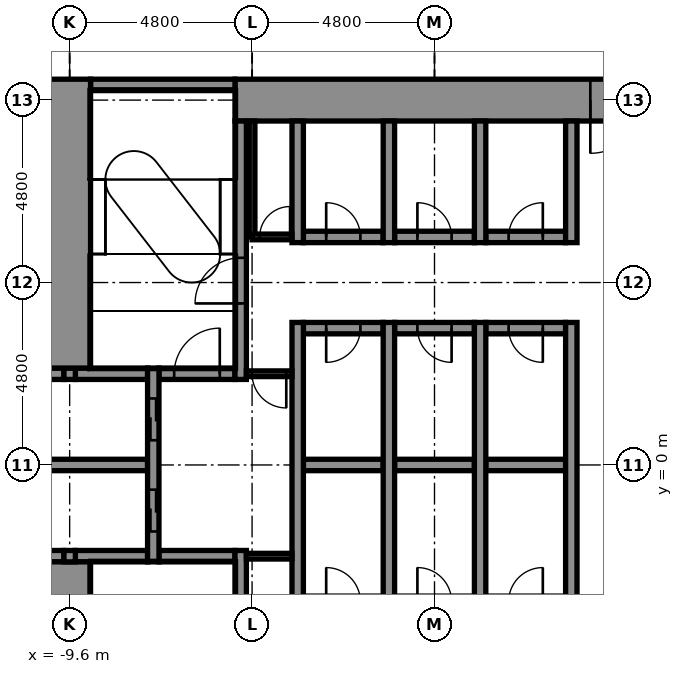
"""IFC4 building model, lengths in metres.
Left out: names, types, materials, properties, quantities, classifications, styles, units other than length and angle.
Written with IfcOpenShell. Run it as: python <this file> out.ifc"""

import sys

from ifc_helpers import new_model, si_unit, direction, frame, frame_2d, origin, place, context, subcontext, project, spatial, rectangle, extrude, element, fill, save


model = new_model("IFC4")
c1 = context("Model", 3, precision=1e-05, world=origin(), true_north=direction((0.0, 1.0)))
c2 = subcontext(c1, "Body", "Model", "MODEL_VIEW")
j1 = project(units=[si_unit("LENGTHUNIT", "METRE"), si_unit("PLANEANGLEUNIT", "RADIAN")], contexts=[c1])
p1 = place(None, origin())
s1 = spatial("IfcSite", under=j1, at=p1, CompositionType="ELEMENT")
p2 = place(p1, origin())
s2 = spatial("IfcBuilding", under=s1, at=p2, CompositionType="ELEMENT")
p3 = place(p2, frame((0.0, 0.0, 7.0)))
s3 = spatial("IfcBuildingStorey", under=s2, at=p3, CompositionType="ELEMENT", Elevation=7.0)
p4 = place(p3, frame((-10.85, -2.4, -0.3), z_axis=(0.0, 0.0, 1.0), x_axis=(1.0, 0.0, 0.0)))
e1 = element("IfcWall", 1, at=p4, inside=s3, PredefinedType="STANDARD", context=c2, shape_type="SweptSolid", body=[
    extrude(rectangle(XDim=1.1, YDim=0.3, at=frame_2d((0.55, 0.0))), origin(), (0.0, 0.0, 1.0), 5.4),
])
p5 = place(p3, frame((-9.45, -2.4, -0.3), z_axis=(0.0, 0.0, 1.0), x_axis=(1.0, 0.0, 0.0)))
e2 = element("IfcWall", 2, at=p5, inside=s3, PredefinedType="STANDARD", context=c2, shape_type="SweptSolid", body=[
    extrude(rectangle(XDim=1.9, YDim=0.3, at=frame_2d((0.95, 0.0))), origin(), (0.0, 0.0, 1.0), 5.4),
])
p6 = place(p3, frame((-7.25, -2.4, -0.3), z_axis=(0.0, 0.0, 1.0), x_axis=(1.0, 0.0, 0.0)))
e3 = element("IfcWall", 3, at=p6, inside=s3, PredefinedType="STANDARD", context=c2, shape_type="SweptSolid", body=[
    extrude(rectangle(XDim=2.0, YDim=0.3, at=frame_2d((1.0, 0.0))), origin(), (0.0, 0.0, 1.0), 5.4),
])
p7 = place(p3, frame((-10.85, 0.0, -0.3), z_axis=(0.0, 0.0, 1.0), x_axis=(1.0, 0.0, 0.0)))
e4 = element("IfcWall", 4, at=p7, inside=s3, PredefinedType="STANDARD", context=c2, shape_type="SweptSolid", body=[
    extrude(rectangle(XDim=3.3, YDim=0.3, at=frame_2d((1.65, 0.0))), origin(), (0.0, 0.0, 1.0), 5.4),
])
p8 = place(p3, frame((-3.45, 0.0, -0.3), z_axis=(0.0, 0.0, 1.0), x_axis=(1.0, 0.0, 0.0)))
e5 = element("IfcWall", 5, at=p8, inside=s3, PredefinedType="STANDARD", context=c2, shape_type="SweptSolid", body=[
    extrude(rectangle(XDim=2.1, YDim=0.3, at=frame_2d((1.05, 0.0))), origin(), (0.0, 0.0, 1.0), 5.4),
])
p9 = place(p3, frame((-1.05, 0.0, -0.3), z_axis=(0.0, 0.0, 1.0), x_axis=(1.0, 0.0, 0.0)))
e6 = element("IfcWall", 6, at=p9, inside=s3, PredefinedType="STANDARD", context=c2, shape_type="SweptSolid", body=[
    extrude(rectangle(XDim=2.1, YDim=0.3, at=frame_2d((1.05, 0.0))), origin(), (0.0, 0.0, 1.0), 5.4),
])
p10 = place(p3, frame((1.35, 0.0, -0.3), z_axis=(0.0, 0.0, 1.0), x_axis=(1.0, 0.0, 0.0)))
e7 = element("IfcWall", 7, at=p10, inside=s3, PredefinedType="STANDARD", context=c2, shape_type="SweptSolid", body=[
    extrude(rectangle(XDim=2.1, YDim=0.3, at=frame_2d((1.05, 0.0))), origin(), (0.0, 0.0, 1.0), 5.4),
])
p11 = place(p3, frame((-10.85, 2.4, -0.3), z_axis=(0.0, 0.0, 1.0), x_axis=(1.0, 0.0, 0.0)))
e8 = element("IfcWall", 8, at=p11, inside=s3, PredefinedType="STANDARD", context=c2, shape_type="SweptSolid", body=[
    extrude(rectangle(XDim=1.1, YDim=0.3, at=frame_2d((0.55, 0.0))), origin(), (0.0, 0.0, 1.0), 5.4),
])
p12 = place(p3, frame((-9.45, 2.4, -0.3), z_axis=(0.0, 0.0, 1.0), x_axis=(1.0, 0.0, 0.0)))
e9 = element("IfcWall", 9, at=p12, inside=s3, PredefinedType="STANDARD", context=c2, shape_type="SweptSolid", body=[
    extrude(rectangle(XDim=1.9, YDim=0.3, at=frame_2d((0.95, 0.0))), origin(), (0.0, 0.0, 1.0), 5.4),
])
p13 = place(p3, frame((-7.25, 2.4, -0.3), z_axis=(0.0, 0.0, 1.0), x_axis=(1.0, 0.0, 0.0)))
e10 = element("IfcWall", 10, at=p13, inside=s3, PredefinedType="STANDARD", context=c2, shape_type="SweptSolid", body=[
    extrude(rectangle(XDim=2.0, YDim=0.3, at=frame_2d((1.0, 0.0))), origin(), (0.0, 0.0, 1.0), 5.4),
])
p14 = place(p13, frame((0.4, 0.0, 0.3)))
e11 = element("IfcOpeningElement", 11, at=p14, cuts=e10, PredefinedType="OPENING", context=c2, shape_type="SweptSolid", body=[
    extrude(rectangle(XDim=1.2, YDim=2.1, at=frame_2d((0.6, 1.05))), frame((0.0, 0.16, 0.0), z_axis=(0.0, -1.0, 0.0), x_axis=(1.0, 0.0, 0.0)), (0.0, 0.0, 1.0), 0.32),
])
p15 = place(p3, frame((-3.45, 3.6, -0.3), z_axis=(0.0, 0.0, 1.0), x_axis=(1.0, 0.0, 0.0)))
e12 = element("IfcWall", 12, at=p15, inside=s3, PredefinedType="STANDARD", context=c2, shape_type="SweptSolid", body=[
    extrude(rectangle(XDim=2.1, YDim=0.3, at=frame_2d((1.05, 0.0))), origin(), (0.0, 0.0, 1.0), 5.4),
])
p16 = place(p15, frame((0.6, 0.0, 0.3)))
e13 = element("IfcOpeningElement", 13, at=p16, cuts=e12, PredefinedType="OPENING", context=c2, shape_type="SweptSolid", body=[
    extrude(rectangle(XDim=0.9, YDim=2.1, at=frame_2d((0.45, 1.05))), frame((0.0, 0.16, 0.0), z_axis=(0.0, -1.0, 0.0), x_axis=(1.0, 0.0, 0.0)), (0.0, 0.0, 1.0), 0.32),
])
p17 = place(p3, frame((-1.05, 3.6, -0.3), z_axis=(0.0, 0.0, 1.0), x_axis=(1.0, 0.0, 0.0)))
e14 = element("IfcWall", 14, at=p17, inside=s3, PredefinedType="STANDARD", context=c2, shape_type="SweptSolid", body=[
    extrude(rectangle(XDim=2.1, YDim=0.3, at=frame_2d((1.05, 0.0))), origin(), (0.0, 0.0, 1.0), 5.4),
])
p18 = place(p17, frame((0.6, 0.0, 0.3)))
e15 = element("IfcOpeningElement", 15, at=p18, cuts=e14, PredefinedType="OPENING", context=c2, shape_type="SweptSolid", body=[
    extrude(rectangle(XDim=0.9, YDim=2.1, at=frame_2d((0.45, 1.05))), frame((0.0, 0.16, 0.0), z_axis=(0.0, -1.0, 0.0), x_axis=(1.0, 0.0, 0.0)), (0.0, 0.0, 1.0), 0.32),
])
p19 = place(p3, frame((1.35, 3.6, -0.3), z_axis=(0.0, 0.0, 1.0), x_axis=(1.0, 0.0, 0.0)))
e16 = element("IfcWall", 16, at=p19, inside=s3, PredefinedType="STANDARD", context=c2, shape_type="SweptSolid", body=[
    extrude(rectangle(XDim=2.1, YDim=0.3, at=frame_2d((1.05, 0.0))), origin(), (0.0, 0.0, 1.0), 5.4),
])
p20 = place(p19, frame((0.6, 0.0, 0.3)))
e17 = element("IfcOpeningElement", 17, at=p20, cuts=e16, PredefinedType="OPENING", context=c2, shape_type="SweptSolid", body=[
    extrude(rectangle(XDim=0.9, YDim=2.1, at=frame_2d((0.45, 1.05))), frame((0.0, 0.16, 0.0), z_axis=(0.0, -1.0, 0.0), x_axis=(1.0, 0.0, 0.0)), (0.0, 0.0, 1.0), 0.32),
])
p21 = place(p3, frame((-3.45, 6.0, -0.3), z_axis=(0.0, 0.0, 1.0), x_axis=(1.0, 0.0, 0.0)))
e18 = element("IfcWall", 18, at=p21, inside=s3, PredefinedType="STANDARD", context=c2, shape_type="SweptSolid", body=[
    extrude(rectangle(XDim=2.1, YDim=0.3, at=frame_2d((1.05, 0.0))), origin(), (0.0, 0.0, 1.0), 5.4),
])
p22 = place(p21, frame((0.6, 0.0, 0.3)))
e19 = element("IfcOpeningElement", 19, at=p22, cuts=e18, PredefinedType="OPENING", context=c2, shape_type="SweptSolid", body=[
    extrude(rectangle(XDim=0.9, YDim=2.1, at=frame_2d((0.45, 1.05))), frame((0.0, 0.16, 0.0), z_axis=(0.0, -1.0, 0.0), x_axis=(1.0, 0.0, 0.0)), (0.0, 0.0, 1.0), 0.32),
])
p23 = place(p3, frame((-1.05, 6.0, -0.3), z_axis=(0.0, 0.0, 1.0), x_axis=(1.0, 0.0, 0.0)))
e20 = element("IfcWall", 20, at=p23, inside=s3, PredefinedType="STANDARD", context=c2, shape_type="SweptSolid", body=[
    extrude(rectangle(XDim=2.1, YDim=0.3, at=frame_2d((1.05, 0.0))), origin(), (0.0, 0.0, 1.0), 5.4),
])
p24 = place(p23, frame((0.6, 0.0, 0.3)))
e21 = element("IfcOpeningElement", 21, at=p24, cuts=e20, PredefinedType="OPENING", context=c2, shape_type="SweptSolid", body=[
    extrude(rectangle(XDim=0.9, YDim=2.1, at=frame_2d((0.45, 1.05))), frame((0.0, 0.16, 0.0), z_axis=(0.0, -1.0, 0.0), x_axis=(1.0, 0.0, 0.0)), (0.0, 0.0, 1.0), 0.32),
])
p25 = place(p3, frame((1.35, 6.0, -0.3), z_axis=(0.0, 0.0, 1.0), x_axis=(1.0, 0.0, 0.0)))
e22 = element("IfcWall", 22, at=p25, inside=s3, PredefinedType="STANDARD", context=c2, shape_type="SweptSolid", body=[
    extrude(rectangle(XDim=2.1, YDim=0.3, at=frame_2d((1.05, 0.0))), origin(), (0.0, 0.0, 1.0), 5.4),
])
p26 = place(p25, frame((0.6, 0.0, 0.3)))
e23 = element("IfcOpeningElement", 23, at=p26, cuts=e22, PredefinedType="OPENING", context=c2, shape_type="SweptSolid", body=[
    extrude(rectangle(XDim=0.9, YDim=2.1, at=frame_2d((0.45, 1.05))), frame((0.0, 0.16, 0.0), z_axis=(0.0, -1.0, 0.0), x_axis=(1.0, 0.0, 0.0)), (0.0, 0.0, 1.0), 0.32),
])
p27 = place(p3, frame((-5.25, 9.6, -0.3), z_axis=(0.0, 0.0, 1.0), x_axis=(1.0, 0.0, 0.0)))
e24 = element("IfcWall", 24, at=p27, inside=s3, PredefinedType="SHEAR", context=c2, shape_type="SweptSolid", body=[
    extrude(rectangle(XDim=14.3, YDim=1.1, at=frame_2d((7.15, 0.0))), origin(), (0.0, 0.0, 1.0), 5.4),
])
p28 = place(p27, frame((9.35, 0.0, 0.3)))
e25 = element("IfcOpeningElement", 25, at=p28, cuts=e24, PredefinedType="OPENING", context=c2, shape_type="SweptSolid", body=[
    extrude(rectangle(XDim=1.4, YDim=2.1, at=frame_2d((0.7, 1.05))), frame((0.0, 0.56, 0.0), z_axis=(0.0, -1.0, 0.0), x_axis=(1.0, 0.0, 0.0)), (0.0, 0.0, 1.0), 1.12),
])
p29 = place(p3, frame((-9.05, 10.0, -0.3), z_axis=(0.0, 0.0, 1.0), x_axis=(1.0, 0.0, 0.0)))
e26 = element("IfcWall", 26, at=p29, inside=s3, PredefinedType="STANDARD", context=c2, shape_type="SweptSolid", body=[
    extrude(rectangle(XDim=3.8, YDim=0.3, at=frame_2d((1.9, 0.0))), origin(), (0.0, 0.0, 1.0), 5.4),
])
p30 = place(p3, frame((-9.6, -10.15, -0.3), z_axis=(0.0, 0.0, 1.0), x_axis=(0.0, 1.0, 0.0)))
e27 = element("IfcWall", 27, at=p30, inside=s3, PredefinedType="SHEAR", context=c2, shape_type="SweptSolid", body=[
    extrude(rectangle(XDim=7.6, YDim=1.1, at=frame_2d((3.8, 0.0))), origin(), (0.0, 0.0, 1.0), 5.4),
])
for number, where, z_axis, x_axis in (
    (28, (-9.6, -2.55, -0.3), (0.0, 0.0, 1.0), (0.0, 1.0, 0.0)),
    (29, (-9.6, 2.25, -0.3), (0.0, 0.0, 1.0), (0.0, 1.0, 0.0)),
):
    element("IfcWall", number, at=place(p3, frame(where, z_axis=z_axis, x_axis=x_axis)), inside=s3, PredefinedType="STANDARD", context=c2, shape_type="SweptSolid", body=[
        extrude(rectangle(XDim=0.3, YDim=0.3, at=frame_2d((0.15, 0.0))), origin(), (0.0, 0.0, 1.0), 5.4),
    ])
p31 = place(p3, frame((-9.6, 2.55, -0.3), z_axis=(0.0, 0.0, 1.0), x_axis=(0.0, 1.0, 0.0)))
e30 = element("IfcWall", 30, at=p31, inside=s3, PredefinedType="SHEAR", context=c2, shape_type="SweptSolid", body=[
    extrude(rectangle(XDim=7.6, YDim=1.1, at=frame_2d((3.8, 0.0))), origin(), (0.0, 0.0, 1.0), 5.4),
])
p32 = place(p3, frame((-7.4, -2.55, -0.3), z_axis=(0.0, 0.0, 1.0), x_axis=(0.0, 1.0, 0.0)))
e31 = element("IfcWall", 31, at=p32, inside=s3, PredefinedType="STANDARD", context=c2, shape_type="SweptSolid", body=[
    extrude(rectangle(XDim=5.1, YDim=0.3, at=frame_2d((2.55, 0.0))), origin(), (0.0, 0.0, 1.0), 5.4),
])
p33 = place(p32, frame((0.8, 0.0, 0.3)))
e32 = element("IfcOpeningElement", 32, at=p33, cuts=e31, PredefinedType="OPENING", context=c2, shape_type="SweptSolid", body=[
    extrude(rectangle(XDim=1.1, YDim=2.1, at=frame_2d((0.55, 1.05))), frame((0.0, 0.16, 0.0), z_axis=(0.0, -1.0, 0.0), x_axis=(1.0, 0.0, 0.0)), (0.0, 0.0, 1.0), 0.32),
])
p34 = place(p32, frame((3.2, 0.0, 0.3)))
e33 = element("IfcOpeningElement", 33, at=p34, cuts=e31, PredefinedType="OPENING", context=c2, shape_type="SweptSolid", body=[
    extrude(rectangle(XDim=1.1, YDim=2.1, at=frame_2d((0.55, 1.05))), frame((0.0, 0.16, 0.0), z_axis=(0.0, -1.0, 0.0), x_axis=(1.0, 0.0, 0.0)), (0.0, 0.0, 1.0), 0.32),
])
p35 = place(p3, frame((-5.1, -9.05, -0.3), z_axis=(0.0, 0.0, 1.0), x_axis=(0.0, 1.0, 0.0)))
e34 = element("IfcWall", 34, at=p35, inside=s3, PredefinedType="STANDARD", context=c2, shape_type="SweptSolid", body=[
    extrude(rectangle(XDim=6.8, YDim=0.3, at=frame_2d((3.4, 0.0))), origin(), (0.0, 0.0, 1.0), 5.4),
])
p36 = place(p35, frame((3.6, 0.0, 0.3)))
e35 = element("IfcOpeningElement", 35, at=p36, cuts=e34, PredefinedType="OPENING", context=c2, shape_type="SweptSolid", body=[
    extrude(rectangle(XDim=1.2, YDim=2.1, at=frame_2d((0.6, 1.05))), frame((0.0, 0.16, 0.0), z_axis=(0.0, -1.0, 0.0), x_axis=(1.0, 0.0, 0.0)), (0.0, 0.0, 1.0), 0.32),
])
p37 = place(p3, frame((-5.1, 2.25, -0.3), z_axis=(0.0, 0.0, 1.0), x_axis=(0.0, 1.0, 0.0)))
e36 = element("IfcWall", 36, at=p37, inside=s3, PredefinedType="STANDARD", context=c2, shape_type="SweptSolid", body=[
    extrude(rectangle(XDim=6.8, YDim=0.3, at=frame_2d((3.4, 0.0))), origin(), (0.0, 0.0, 1.0), 5.4),
])
p38 = place(p37, frame((2.0, 0.0, 0.3)))
e37 = element("IfcOpeningElement", 37, at=p38, cuts=e36, PredefinedType="OPENING", context=c2, shape_type="SweptSolid", body=[
    extrude(rectangle(XDim=1.2, YDim=2.1, at=frame_2d((0.6, 1.05))), frame((0.0, 0.16, 0.0), z_axis=(0.0, -1.0, 0.0), x_axis=(1.0, 0.0, 0.0)), (0.0, 0.0, 1.0), 0.32),
])
p39 = place(p3, frame((-3.6, -3.75, -0.3), z_axis=(0.0, 0.0, 1.0), x_axis=(0.0, 1.0, 0.0)))
e38 = element("IfcWall", 38, at=p39, inside=s3, PredefinedType="STANDARD", context=c2, shape_type="SweptSolid", body=[
    extrude(rectangle(XDim=7.5, YDim=0.3, at=frame_2d((3.75, 0.0))), origin(), (0.0, 0.0, 1.0), 5.4),
])
p40 = place(p3, frame((-3.6, 5.85, -0.3), z_axis=(0.0, 0.0, 1.0), x_axis=(0.0, 1.0, 0.0)))
e39 = element("IfcWall", 39, at=p40, inside=s3, PredefinedType="STANDARD", context=c2, shape_type="SweptSolid", body=[
    extrude(rectangle(XDim=3.2, YDim=0.3, at=frame_2d((1.6, 0.0))), origin(), (0.0, 0.0, 1.0), 5.4),
])
p41 = place(p3, frame((-1.2, -3.75, -0.3), z_axis=(0.0, 0.0, 1.0), x_axis=(0.0, 1.0, 0.0)))
e40 = element("IfcWall", 40, at=p41, inside=s3, PredefinedType="STANDARD", context=c2, shape_type="SweptSolid", body=[
    extrude(rectangle(XDim=7.5, YDim=0.3, at=frame_2d((3.75, 0.0))), origin(), (0.0, 0.0, 1.0), 5.4),
])
p42 = place(p3, frame((-1.2, 5.85, -0.3), z_axis=(0.0, 0.0, 1.0), x_axis=(0.0, 1.0, 0.0)))
e41 = element("IfcWall", 41, at=p42, inside=s3, PredefinedType="STANDARD", context=c2, shape_type="SweptSolid", body=[
    extrude(rectangle(XDim=3.2, YDim=0.3, at=frame_2d((1.6, 0.0))), origin(), (0.0, 0.0, 1.0), 5.4),
])
p43 = place(p3, frame((1.2, -3.75, -0.3), z_axis=(0.0, 0.0, 1.0), x_axis=(0.0, 1.0, 0.0)))
e42 = element("IfcWall", 42, at=p43, inside=s3, PredefinedType="STANDARD", context=c2, shape_type="SweptSolid", body=[
    extrude(rectangle(XDim=7.5, YDim=0.3, at=frame_2d((3.75, 0.0))), origin(), (0.0, 0.0, 1.0), 5.4),
])
p44 = place(p3, frame((1.2, 5.85, -0.3), z_axis=(0.0, 0.0, 1.0), x_axis=(0.0, 1.0, 0.0)))
e43 = element("IfcWall", 43, at=p44, inside=s3, PredefinedType="STANDARD", context=c2, shape_type="SweptSolid", body=[
    extrude(rectangle(XDim=3.2, YDim=0.3, at=frame_2d((1.6, 0.0))), origin(), (0.0, 0.0, 1.0), 5.4),
])
p45 = place(p3, frame((3.6, -3.75, -0.3), z_axis=(0.0, 0.0, 1.0), x_axis=(0.0, 1.0, 0.0)))
e44 = element("IfcWall", 44, at=p45, inside=s3, PredefinedType="STANDARD", context=c2, shape_type="SweptSolid", body=[
    extrude(rectangle(XDim=7.5, YDim=0.3, at=frame_2d((3.75, 0.0))), origin(), (0.0, 0.0, 1.0), 5.4),
])
p46 = place(p3, frame((3.6, 5.85, -0.3), z_axis=(0.0, 0.0, 1.0), x_axis=(0.0, 1.0, 0.0)))
e45 = element("IfcWall", 45, at=p46, inside=s3, PredefinedType="STANDARD", context=c2, shape_type="SweptSolid", body=[
    extrude(rectangle(XDim=3.2, YDim=0.3, at=frame_2d((1.6, 0.0))), origin(), (0.0, 0.0, 1.0), 5.4),
])
p47 = place(p3, frame((-4.8, 6.0, 0.0), z_axis=(0.0, 0.0, 1.0), x_axis=(0.0, 1.0, 0.0)))
e46 = element("IfcWall", 46, at=p47, inside=s3, PredefinedType="PARTITIONING", context=c2, shape_type="SweptSolid", body=[
    extrude(rectangle(XDim=3.05, YDim=0.15, at=frame_2d((1.525, 0.0))), origin(), (0.0, 0.0, 1.0), 5.1),
])
p48 = place(p3, frame((-4.8, 6.0, 0.0), z_axis=(0.0, 0.0, 1.0), x_axis=(1.0, 0.0, 0.0)))
e47 = element("IfcWall", 47, at=p48, inside=s3, PredefinedType="PARTITIONING", context=c2, shape_type="SweptSolid", body=[
    extrude(rectangle(XDim=1.05, YDim=0.15, at=frame_2d((0.525, 0.0))), origin(), (0.0, 0.0, 1.0), 5.1),
])
p49 = place(p48, frame((0.2, 0.0, 0.0)))
e48 = element("IfcOpeningElement", 48, at=p49, cuts=e47, PredefinedType="OPENING", context=c2, shape_type="SweptSolid", body=[
    extrude(rectangle(XDim=0.8, YDim=2.1, at=frame_2d((0.4, 1.05))), frame((0.0, 0.085, 0.0), z_axis=(0.0, -1.0, 0.0), x_axis=(1.0, 0.0, 0.0)), (0.0, 0.0, 1.0), 0.17),
])
p50 = place(p3, frame((-4.95, 2.4, 0.0), z_axis=(0.0, 0.0, 1.0), x_axis=(1.0, 0.0, 0.0)))
e49 = element("IfcWall", 49, at=p50, inside=s3, PredefinedType="PARTITIONING", context=c2, shape_type="SweptSolid", body=[
    extrude(rectangle(XDim=1.2, YDim=0.15, at=frame_2d((0.6, 0.0))), origin(), (0.0, 0.0, 1.0), 5.1),
])
p51 = place(p50, frame((0.15, 0.0, 0.0)))
e50 = element("IfcOpeningElement", 50, at=p51, cuts=e49, PredefinedType="OPENING", context=c2, shape_type="SweptSolid", body=[
    extrude(rectangle(XDim=0.9, YDim=2.1, at=frame_2d((0.45, 1.05))), frame((0.0, 0.085, 0.0), z_axis=(0.0, -1.0, 0.0), x_axis=(1.0, 0.0, 0.0)), (0.0, 0.0, 1.0), 0.17),
])
p52 = place(p3, frame((-4.95, -2.4, 0.0), z_axis=(0.0, 0.0, 1.0), x_axis=(1.0, 0.0, 0.0)))
e51 = element("IfcWall", 51, at=p52, inside=s3, PredefinedType="PARTITIONING", context=c2, shape_type="SweptSolid", body=[
    extrude(rectangle(XDim=1.2, YDim=0.15, at=frame_2d((0.6, 0.0))), origin(), (0.0, 0.0, 1.0), 5.1),
])
p53 = place(p49, origin())
e52 = element("IfcDoor", 52, at=p53, inside=s3, OperationType="SINGLE_SWING_RIGHT", PredefinedType="DOOR", context=c2, shape_type="SweptSolid", body=[
    extrude(rectangle(XDim=0.8, YDim=2.1, at=frame_2d((0.4, 1.05))), frame((0.0, 0.025, 0.0), z_axis=(0.0, -1.0, 0.0), x_axis=(1.0, 0.0, 0.0)), (0.0, 0.0, 1.0), 0.05),
])
fill(e48, e52)
p54 = place(p33, origin())
e53 = element("IfcDoor", 53, at=p54, inside=s3, OperationType="DOUBLE_DOOR_SLIDING", PredefinedType="DOOR", context=c2, shape_type="SweptSolid", body=[
    extrude(rectangle(XDim=1.1, YDim=2.1, at=frame_2d((0.55, 1.05))), frame((0.0, 0.025, 0.0), z_axis=(0.0, -1.0, 0.0), x_axis=(1.0, 0.0, 0.0)), (0.0, 0.0, 1.0), 0.05),
])
fill(e32, e53)
p55 = place(p34, origin())
e54 = element("IfcDoor", 54, at=p55, inside=s3, OperationType="DOUBLE_DOOR_SLIDING", PredefinedType="DOOR", context=c2, shape_type="SweptSolid", body=[
    extrude(rectangle(XDim=1.1, YDim=2.1, at=frame_2d((0.55, 1.05))), frame((0.0, 0.025, 0.0), z_axis=(0.0, -1.0, 0.0), x_axis=(1.0, 0.0, 0.0)), (0.0, 0.0, 1.0), 0.05),
])
fill(e33, e54)
p56 = place(p38, origin())
e55 = element("IfcDoor", 55, at=p56, inside=s3, OperationType="SINGLE_SWING_LEFT", PredefinedType="DOOR", context=c2, shape_type="SweptSolid", body=[
    extrude(rectangle(XDim=1.2, YDim=2.1, at=frame_2d((0.6, 1.05))), frame((0.0, 0.025, 0.0), z_axis=(0.0, -1.0, 0.0), x_axis=(1.0, 0.0, 0.0)), (0.0, 0.0, 1.0), 0.05),
])
fill(e37, e55)
p57 = place(p22, origin())
e56 = element("IfcDoor", 56, at=p57, inside=s3, OperationType="SINGLE_SWING_LEFT", PredefinedType="DOOR", context=c2, shape_type="SweptSolid", body=[
    extrude(rectangle(XDim=0.9, YDim=2.1, at=frame_2d((0.45, 1.05))), frame((0.0, 0.025, 0.0), z_axis=(0.0, -1.0, 0.0), x_axis=(1.0, 0.0, 0.0)), (0.0, 0.0, 1.0), 0.05),
])
fill(e19, e56)
p58 = place(p24, origin())
e57 = element("IfcDoor", 57, at=p58, inside=s3, OperationType="SINGLE_SWING_LEFT", PredefinedType="DOOR", context=c2, shape_type="SweptSolid", body=[
    extrude(rectangle(XDim=0.9, YDim=2.1, at=frame_2d((0.45, 1.05))), frame((0.0, 0.025, 0.0), z_axis=(0.0, -1.0, 0.0), x_axis=(1.0, 0.0, 0.0)), (0.0, 0.0, 1.0), 0.05),
])
fill(e21, e57)
p59 = place(p26, origin())
e58 = element("IfcDoor", 58, at=p59, inside=s3, OperationType="SINGLE_SWING_RIGHT", PredefinedType="DOOR", context=c2, shape_type="SweptSolid", body=[
    extrude(rectangle(XDim=0.9, YDim=2.1, at=frame_2d((0.45, 1.05))), frame((0.0, 0.025, 0.0), z_axis=(0.0, -1.0, 0.0), x_axis=(1.0, 0.0, 0.0)), (0.0, 0.0, 1.0), 0.05),
])
fill(e23, e58)
p60 = place(p16, frame((0.9, 0.0, 0.0), z_axis=(0.0, 0.0, 1.0), x_axis=(-1.0, 0.0, 0.0)))
e59 = element("IfcDoor", 59, at=p60, inside=s3, OperationType="SINGLE_SWING_LEFT", PredefinedType="DOOR", context=c2, shape_type="SweptSolid", body=[
    extrude(rectangle(XDim=0.9, YDim=2.1, at=frame_2d((0.45, 1.05))), frame((0.0, 0.025, 0.0), z_axis=(0.0, -1.0, 0.0), x_axis=(1.0, 0.0, 0.0)), (0.0, 0.0, 1.0), 0.05),
])
fill(e13, e59)
p61 = place(p18, frame((0.9, 0.0, 0.0), z_axis=(0.0, 0.0, 1.0), x_axis=(-1.0, 0.0, 0.0)))
e60 = element("IfcDoor", 60, at=p61, inside=s3, OperationType="SINGLE_SWING_RIGHT", PredefinedType="DOOR", context=c2, shape_type="SweptSolid", body=[
    extrude(rectangle(XDim=0.9, YDim=2.1, at=frame_2d((0.45, 1.05))), frame((0.0, 0.025, 0.0), z_axis=(0.0, -1.0, 0.0), x_axis=(1.0, 0.0, 0.0)), (0.0, 0.0, 1.0), 0.05),
])
fill(e15, e60)
p62 = place(p20, frame((0.9, 0.0, 0.0), z_axis=(0.0, 0.0, 1.0), x_axis=(-1.0, 0.0, 0.0)))
e61 = element("IfcDoor", 61, at=p62, inside=s3, OperationType="SINGLE_SWING_RIGHT", PredefinedType="DOOR", context=c2, shape_type="SweptSolid", body=[
    extrude(rectangle(XDim=0.9, YDim=2.1, at=frame_2d((0.45, 1.05))), frame((0.0, 0.025, 0.0), z_axis=(0.0, -1.0, 0.0), x_axis=(1.0, 0.0, 0.0)), (0.0, 0.0, 1.0), 0.05),
])
fill(e17, e61)
p63 = place(p28, frame((1.4, 0.0, 0.0), z_axis=(0.0, 0.0, 1.0), x_axis=(-1.0, 0.0, 0.0)))
e62 = element("IfcDoor", 62, at=p63, inside=s3, OperationType="SINGLE_SWING_LEFT", PredefinedType="DOOR", context=c2, shape_type="SweptSolid", body=[
    extrude(rectangle(XDim=1.4, YDim=2.1, at=frame_2d((0.7, 1.05))), frame((0.0, 0.025, 0.0), z_axis=(0.0, -1.0, 0.0), x_axis=(1.0, 0.0, 0.0)), (0.0, 0.0, 1.0), 0.05),
])
fill(e25, e62)
p64 = place(p51, frame((0.9, 0.0, 0.0), z_axis=(0.0, 0.0, 1.0), x_axis=(-1.0, 0.0, 0.0)))
e63 = element("IfcDoor", 63, at=p64, inside=s3, OperationType="SINGLE_SWING_RIGHT", PredefinedType="DOOR", context=c2, shape_type="SweptSolid", body=[
    extrude(rectangle(XDim=0.9, YDim=2.1, at=frame_2d((0.45, 1.05))), frame((0.0, 0.025, 0.0), z_axis=(0.0, -1.0, 0.0), x_axis=(1.0, 0.0, 0.0)), (0.0, 0.0, 1.0), 0.05),
])
fill(e50, e63)
p65 = place(p14, origin())
e64 = element("IfcDoor", 64, at=p65, inside=s3, OperationType="SINGLE_SWING_RIGHT", PredefinedType="DOOR", context=c2, shape_type="SweptSolid", body=[
    extrude(rectangle(XDim=1.2, YDim=2.1, at=frame_2d((0.6, 1.05))), frame((0.0, 0.025, 0.0), z_axis=(0.0, -1.0, 0.0), x_axis=(1.0, 0.0, 0.0)), (0.0, 0.0, 1.0), 0.05),
])
fill(e11, e64)
save(model, sys.argv[1])
